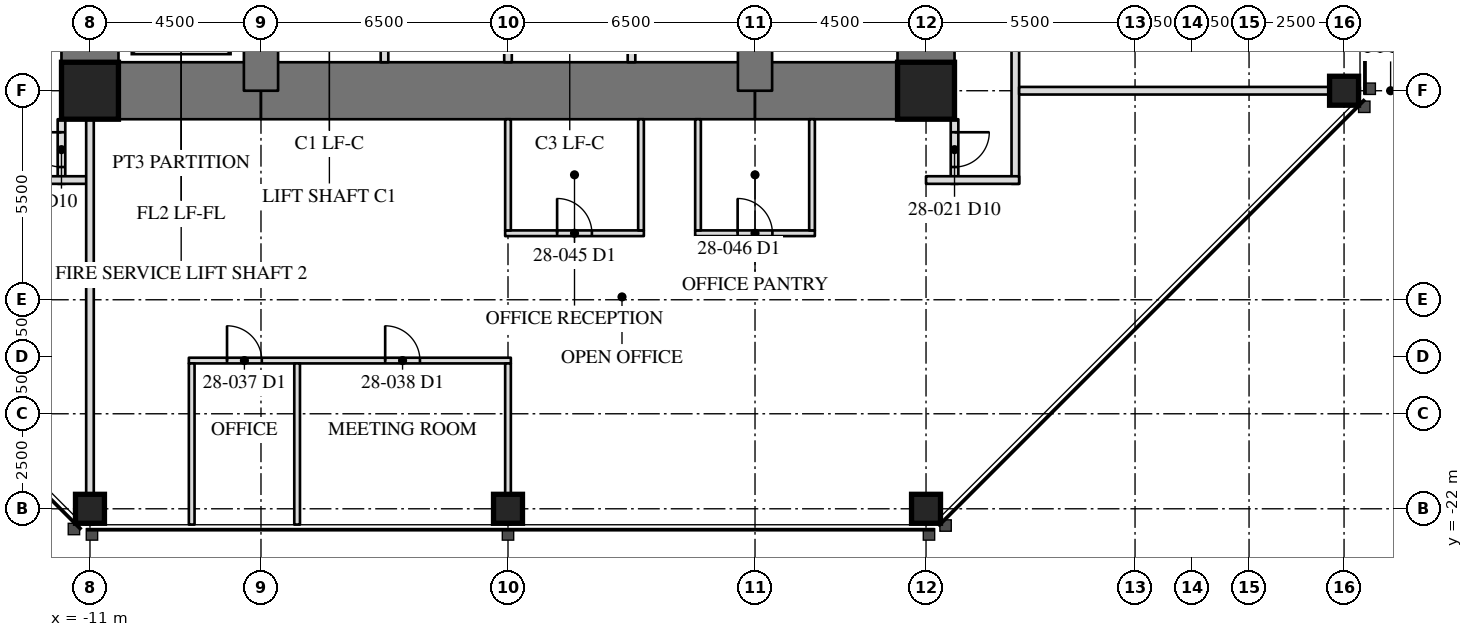
"""IFC4 building model, lengths in metres.
Left out: names, types, materials, properties, quantities, classifications, styles, units other than length and angle.
Written with IfcOpenShell. Run it as: python <this file> out.ifc"""

import sys

from ifc_helpers import new_model, si_unit, direction, frame, frame_2d, origin, origin_2d, place, context, subcontext, project, spatial, rectangle, hollow_rectangle, extrude, element, fill, save


model = new_model("IFC4")
c1 = context("Model", 3, precision=1e-05, world=origin(), true_north=direction((0.0, 1.0)))
c2 = subcontext(c1, "Body", "Model", "MODEL_VIEW")
j1 = project(units=[si_unit("LENGTHUNIT", "METRE"), si_unit("PLANEANGLEUNIT", "RADIAN")], contexts=[c1])
p1 = place(None, origin())
s1 = spatial("IfcSite", under=j1, at=p1, CompositionType="ELEMENT")
p2 = place(p1, origin())
s2 = spatial("IfcBuilding", under=s1, at=p2, CompositionType="ELEMENT")
p3 = place(p2, frame((0.0, 0.0, 121.3)))
s3 = spatial("IfcBuildingStorey", under=s2, at=p3, CompositionType="ELEMENT", Elevation=121.3)
for number, where, z_axis, x_axis in (
    (1, (-11.0, -22.0, 0.0), (0.0, 0.0, 1.0), (1.0, 0.0, 0.0)),
    (2, (0.0, -22.0, 0.0), (0.0, 0.0, 1.0), (1.0, 0.0, 0.0)),
    (3, (11.0, -22.0, 0.0), (0.0, 0.0, 1.0), (1.0, 0.0, 0.0)),
    (4, (22.0, -11.0, 0.0), (0.0, 0.0, 1.0), (0.0, 1.0, 0.0)),
):
    element("IfcColumn", number, at=place(p3, frame(where, z_axis=z_axis, x_axis=x_axis)), inside=s3, PredefinedType="COLUMN", context=c2, shape_type="SweptSolid", body=[
        extrude(hollow_rectangle(XDim=0.762, YDim=0.762, WallThickness=0.127, at=origin_2d()), origin(), (0.0, 0.0, 1.0), 4.1),
    ])
p4 = place(p3, frame((11.0, -11.0, 0.0), z_axis=(0.0, 0.0, 1.0), x_axis=(0.0, 1.0, 0.0)))
e5 = element("IfcWall", 5, at=p4, inside=s3, PredefinedType="SHEAR", context=c2, shape_type="SweptSolid", body=[
    extrude(rectangle(XDim=22.0, YDim=1.5, at=frame_2d((11.0, 0.0))), origin(), (0.0, 0.0, 1.0), 4.1),
])
p5 = place(p4, frame((15.393, 0.0, 0.0)))
e6 = element("IfcOpeningElement", 6, at=p5, cuts=e5, PredefinedType="OPENING", context=c2, shape_type="SweptSolid", body=[
    extrude(rectangle(XDim=0.915, YDim=2.134, at=frame_2d((0.458, 1.067))), frame((0.0, 0.76, 0.0), z_axis=(0.0, -1.0, 0.0), x_axis=(1.0, 0.0, 0.0)), (0.0, 0.0, 1.0), 1.52),
])
p6 = place(p3, frame((-11.0, 11.0, 0.0), z_axis=(0.0, 0.0, 1.0), x_axis=(0.0, -1.0, 0.0)))
e7 = element("IfcWall", 7, at=p6, inside=s3, PredefinedType="SHEAR", context=c2, shape_type="SweptSolid", body=[
    extrude(rectangle(XDim=22.0, YDim=1.5, at=frame_2d((11.0, 0.0))), origin(), (0.0, 0.0, 1.0), 4.1),
])
p7 = place(p6, frame((15.393, 0.0, 0.0)))
e8 = element("IfcOpeningElement", 8, at=p7, cuts=e7, PredefinedType="OPENING", context=c2, shape_type="SweptSolid", body=[
    extrude(rectangle(XDim=0.915, YDim=2.134, at=frame_2d((0.458, 1.067))), frame((0.0, 0.76, 0.0), z_axis=(0.0, -1.0, 0.0), x_axis=(1.0, 0.0, 0.0)), (0.0, 0.0, 1.0), 1.52),
])
p8 = place(p3, frame((-11.0, -11.0, 0.0), z_axis=(0.0, 0.0, 1.0), x_axis=(1.0, 0.0, 0.0)))
e9 = element("IfcWall", 9, at=p8, inside=s3, PredefinedType="SHEAR", context=c2, shape_type="SweptSolid", body=[
    extrude(rectangle(XDim=4.5, YDim=1.5, at=frame_2d((2.25, 0.0))), origin(), (0.0, 0.0, 1.0), 4.1),
])
p9 = place(p3, frame((-6.5, -11.0, 0.0), z_axis=(0.0, 0.0, 1.0), x_axis=(1.0, 0.0, 0.0)))
e10 = element("IfcWall", 10, at=p9, inside=s3, PredefinedType="SHEAR", context=c2, shape_type="SweptSolid", body=[
    extrude(rectangle(XDim=13.0, YDim=1.5, at=frame_2d((6.5, 0.0))), origin(), (0.0, 0.0, 1.0), 4.1),
])
p10 = place(p3, frame((6.5, -11.0, 0.0), z_axis=(0.0, 0.0, 1.0), x_axis=(1.0, 0.0, 0.0)))
e11 = element("IfcWall", 11, at=p10, inside=s3, PredefinedType="SHEAR", context=c2, shape_type="SweptSolid", body=[
    extrude(rectangle(XDim=4.5, YDim=1.5, at=frame_2d((2.25, 0.0))), origin(), (0.0, 0.0, 1.0), 4.1),
])
for number, where, z_axis, x_axis in (
    (12, (6.5, -11.0, 0.0), (0.0, 0.0, 1.0), (0.0, 1.0, 0.0)),
    (13, (-6.5, -6.5, 0.0), (0.0, 0.0, 1.0), (0.0, -1.0, 0.0)),
):
    element("IfcWall", number, at=place(p3, frame(where, z_axis=z_axis, x_axis=x_axis)), inside=s3, PredefinedType="SHEAR", context=c2, shape_type="SweptSolid", body=[
        extrude(rectangle(XDim=4.5, YDim=0.9, at=frame_2d((2.25, 0.0))), origin(), (0.0, 0.0, 1.0), 4.1),
    ])
for number, where, z_axis, x_axis in (
    (14, (-11.0, -11.0, 0.0), (0.0, 0.0, 1.0), (1.0, 0.0, 0.0)),
    (15, (11.0, -11.0, 0.0), (0.0, 0.0, 1.0), (1.0, 0.0, 0.0)),
):
    element("IfcColumn", number, at=place(p3, frame(where, z_axis=z_axis, x_axis=x_axis)), inside=s3, PredefinedType="COLUMN", context=c2, shape_type="SweptSolid", body=[
        extrude(hollow_rectangle(XDim=1.499, YDim=1.499, WallThickness=0.102, at=origin_2d()), origin(), (0.0, 0.0, 1.0), 4.1),
    ])
for number, where, z_axis, x_axis in (
    (16, (-3.25, -10.25, 0.0), (0.0, 0.0, 1.0), (0.0, 1.0, 0.0)),
    (17, (0.0, -10.25, 0.0), (0.0, 0.0, 1.0), (0.0, 1.0, 0.0)),
    (18, (3.25, -10.25, 0.0), (0.0, 0.0, 1.0), (0.0, 1.0, 0.0)),
):
    element("IfcWall", number, at=place(p3, frame(where, z_axis=z_axis, x_axis=x_axis)), inside=s3, PredefinedType="PARTITIONING", context=c2, shape_type="SweptSolid", body=[
        extrude(rectangle(XDim=3.3, YDim=0.2, at=frame_2d((1.65, 0.0))), origin(), (0.0, 0.0, 1.0), 3.91),
    ])
p11 = place(p3, frame((13.35, -13.45, 0.0), z_axis=(0.0, 0.0, 1.0), x_axis=(0.0, 1.0, 0.0)))
e19 = element("IfcWall", 19, at=p11, inside=s3, PredefinedType="PARTITIONING", context=c2, shape_type="SweptSolid", body=[
    extrude(rectangle(XDim=26.7, YDim=0.2, at=frame_2d((13.35, 0.0))), origin(), (0.0, 0.0, 1.0), 3.91),
])
p12 = place(p11, frame((6.742, 0.0, 0.0)))
e20 = element("IfcOpeningElement", 20, at=p12, cuts=e19, PredefinedType="OPENING", context=c2, shape_type="SweptSolid", body=[
    extrude(rectangle(XDim=0.915, YDim=2.134, at=frame_2d((0.458, 1.067))), frame((0.0, 0.11, 0.0), z_axis=(0.0, -1.0, 0.0), x_axis=(1.0, 0.0, 0.0)), (0.0, 0.0, 1.0), 0.22),
])
p13 = place(p3, frame((11.75, -11.75, 0.0), z_axis=(0.0, 0.0, 1.0), x_axis=(0.0, -1.0, 0.0)))
e21 = element("IfcWall", 21, at=p13, inside=s3, PredefinedType="PARTITIONING", context=c2, shape_type="SweptSolid", body=[
    extrude(rectangle(XDim=1.7, YDim=0.2, at=frame_2d((0.85, 0.0))), origin(), (0.0, 0.0, 1.0), 3.91),
])
p14 = place(p13, frame((0.343, 0.0, 0.0)))
e22 = element("IfcOpeningElement", 22, at=p14, cuts=e21, PredefinedType="OPENING", context=c2, shape_type="SweptSolid", body=[
    extrude(rectangle(XDim=0.915, YDim=2.134, at=frame_2d((0.458, 1.067))), frame((0.0, 0.11, 0.0), z_axis=(0.0, -1.0, 0.0), x_axis=(1.0, 0.0, 0.0)), (0.0, 0.0, 1.0), 0.22),
])
p15 = place(p3, frame((11.0, -13.35, 0.0), z_axis=(0.0, 0.0, 1.0), x_axis=(1.0, 0.0, 0.0)))
e23 = element("IfcWall", 23, at=p15, inside=s3, PredefinedType="PARTITIONING", context=c2, shape_type="SweptSolid", body=[
    extrude(rectangle(XDim=2.45, YDim=0.2, at=frame_2d((1.225, 0.0))), origin(), (0.0, 0.0, 1.0), 3.91),
])
p16 = place(p3, frame((-11.75, -11.75, 0.0), z_axis=(0.0, 0.0, 1.0), x_axis=(0.0, -1.0, 0.0)))
e24 = element("IfcWall", 24, at=p16, inside=s3, PredefinedType="PARTITIONING", context=c2, shape_type="SweptSolid", body=[
    extrude(rectangle(XDim=1.7, YDim=0.2, at=frame_2d((0.85, 0.0))), origin(), (0.0, 0.0, 1.0), 3.91),
])
p17 = place(p16, frame((0.343, 0.0, 0.0)))
e25 = element("IfcOpeningElement", 25, at=p17, cuts=e24, PredefinedType="OPENING", context=c2, shape_type="SweptSolid", body=[
    extrude(rectangle(XDim=0.915, YDim=2.134, at=frame_2d((0.458, 1.067))), frame((0.0, 0.11, 0.0), z_axis=(0.0, -1.0, 0.0), x_axis=(1.0, 0.0, 0.0)), (0.0, 0.0, 1.0), 0.22),
])
p18 = place(p3, frame((-11.0, -13.35, 0.0), z_axis=(0.0, 0.0, 1.0), x_axis=(-1.0, 0.0, 0.0)))
e26 = element("IfcWall", 26, at=p18, inside=s3, PredefinedType="PARTITIONING", context=c2, shape_type="SweptSolid", body=[
    extrude(rectangle(XDim=2.45, YDim=0.2, at=frame_2d((1.225, 0.0))), origin(), (0.0, 0.0, 1.0), 3.91),
])
p19 = place(p3, frame((-11.0, -11.75, 0.0), z_axis=(0.0, 0.0, 1.0), x_axis=(0.0, -1.0, 0.0)))
e27 = element("IfcWall", 27, at=p19, inside=s3, PredefinedType="PARTITIONING", context=c2, shape_type="SweptSolid", body=[
    extrude(rectangle(XDim=10.665, YDim=0.2, at=frame_2d((5.333, 0.0))), origin(), (0.0, 0.0, 1.0), 3.326),
])
p20 = place(p3, frame((13.45, -11.0, 0.0), z_axis=(0.0, 0.0, 1.0), x_axis=(1.0, 0.0, 0.0)))
e28 = element("IfcWall", 28, at=p20, inside=s3, PredefinedType="PARTITIONING", context=c2, shape_type="SweptSolid", body=[
    extrude(rectangle(XDim=8.965, YDim=0.2, at=frame_2d((4.482, 0.0))), origin(), (0.0, 0.0, 1.0), 3.326),
])
p21 = place(p3, frame((-8.398, -18.1, 0.0), z_axis=(0.0, 0.0, 1.0), x_axis=(1.0, 0.0, 0.0)))
e29 = element("IfcWall", 29, at=p21, inside=s3, PredefinedType="PARTITIONING", context=c2, shape_type="SweptSolid", body=[
    extrude(rectangle(XDim=8.473, YDim=0.15, at=frame_2d((4.236, 0.0))), origin(), (0.0, 0.0, 1.0), 3.91),
])
p22 = place(p21, frame((1.004, 0.0, 0.0)))
e30 = element("IfcOpeningElement", 30, at=p22, cuts=e29, PredefinedType="OPENING", context=c2, shape_type="SweptSolid", body=[
    extrude(rectangle(XDim=0.915, YDim=2.134, at=frame_2d((0.458, 1.067))), frame((0.0, 0.085, 0.0), z_axis=(0.0, -1.0, 0.0), x_axis=(1.0, 0.0, 0.0)), (0.0, 0.0, 1.0), 0.17),
])
p23 = place(p21, frame((5.166, 0.0, 0.0)))
e31 = element("IfcOpeningElement", 31, at=p23, cuts=e29, PredefinedType="OPENING", context=c2, shape_type="SweptSolid", body=[
    extrude(rectangle(XDim=0.915, YDim=2.134, at=frame_2d((0.458, 1.067))), frame((0.0, 0.085, 0.0), z_axis=(0.0, -1.0, 0.0), x_axis=(1.0, 0.0, 0.0)), (0.0, 0.0, 1.0), 0.17),
])
for number, where, z_axis, x_axis in (
    (32, (-8.323, -18.175, 0.0), (0.0, 0.0, 1.0), (0.0, -1.0, 0.0)),
    (33, (-5.549, -18.175, 0.0), (0.0, 0.0, 1.0), (0.0, -1.0, 0.0)),
):
    element("IfcWall", number, at=place(p3, frame(where, z_axis=z_axis, x_axis=x_axis)), inside=s3, PredefinedType="PARTITIONING", context=c2, shape_type="SweptSolid", body=[
        extrude(rectangle(XDim=4.24, YDim=0.15, at=frame_2d((2.12, 0.0))), origin(), (0.0, 0.0, 1.0), 3.91),
    ])
p24 = place(p3, frame((0.0, -18.175, 0.0), z_axis=(0.0, 0.0, 1.0), x_axis=(0.0, -1.0, 0.0)))
e34 = element("IfcWall", 34, at=p24, inside=s3, PredefinedType="PARTITIONING", context=c2, shape_type="SweptSolid", body=[
    extrude(rectangle(XDim=4.24, YDim=0.15, at=frame_2d((2.12, 0.0))), origin(), (0.0, 0.0, 1.0), 3.326),
])
p25 = place(p3, frame((-0.075, -14.75, 0.0), z_axis=(0.0, 0.0, 1.0), x_axis=(1.0, 0.0, 0.0)))
e35 = element("IfcWall", 35, at=p25, inside=s3, PredefinedType="PARTITIONING", context=c2, shape_type="SweptSolid", body=[
    extrude(rectangle(XDim=3.65, YDim=0.15, at=frame_2d((1.825, 0.0))), origin(), (0.0, 0.0, 1.0), 3.91),
])
p26 = place(p25, frame((1.367, 0.0, 0.0)))
e36 = element("IfcOpeningElement", 36, at=p26, cuts=e35, PredefinedType="OPENING", context=c2, shape_type="SweptSolid", body=[
    extrude(rectangle(XDim=0.915, YDim=2.134, at=frame_2d((0.458, 1.067))), frame((0.0, 0.085, 0.0), z_axis=(0.0, -1.0, 0.0), x_axis=(1.0, 0.0, 0.0)), (0.0, 0.0, 1.0), 0.17),
])
p27 = place(p3, frame((0.0, -14.675, 0.0), z_axis=(0.0, 0.0, 1.0), x_axis=(0.0, 1.0, 0.0)))
e37 = element("IfcWall", 37, at=p27, inside=s3, PredefinedType="PARTITIONING", context=c2, shape_type="SweptSolid", body=[
    extrude(rectangle(XDim=2.925, YDim=0.15, at=frame_2d((1.462, 0.0))), origin(), (0.0, 0.0, 1.0), 3.326),
])
p28 = place(p3, frame((3.5, -14.675, 0.0), z_axis=(0.0, 0.0, 1.0), x_axis=(0.0, 1.0, 0.0)))
e38 = element("IfcWall", 38, at=p28, inside=s3, PredefinedType="PARTITIONING", context=c2, shape_type="SweptSolid", body=[
    extrude(rectangle(XDim=2.925, YDim=0.15, at=frame_2d((1.462, 0.0))), origin(), (0.0, 0.0, 1.0), 3.91),
])
p29 = place(p3, frame((4.925, -14.75, 0.0), z_axis=(0.0, 0.0, 1.0), x_axis=(1.0, 0.0, 0.0)))
e39 = element("IfcWall", 39, at=p29, inside=s3, PredefinedType="PARTITIONING", context=c2, shape_type="SweptSolid", body=[
    extrude(rectangle(XDim=3.15, YDim=0.15, at=frame_2d((1.575, 0.0))), origin(), (0.0, 0.0, 1.0), 3.91),
])
p30 = place(p29, frame((1.117, 0.0, 0.0)))
e40 = element("IfcOpeningElement", 40, at=p30, cuts=e39, PredefinedType="OPENING", context=c2, shape_type="SweptSolid", body=[
    extrude(rectangle(XDim=0.915, YDim=2.134, at=frame_2d((0.458, 1.067))), frame((0.0, 0.085, 0.0), z_axis=(0.0, -1.0, 0.0), x_axis=(1.0, 0.0, 0.0)), (0.0, 0.0, 1.0), 0.17),
])
for number, where, z_axis, x_axis in (
    (41, (5.0, -14.675, 0.0), (0.0, 0.0, 1.0), (0.0, 1.0, 0.0)),
    (42, (8.0, -14.675, 0.0), (0.0, 0.0, 1.0), (0.0, 1.0, 0.0)),
):
    element("IfcWall", number, at=place(p3, frame(where, z_axis=z_axis, x_axis=x_axis)), inside=s3, PredefinedType="PARTITIONING", context=c2, shape_type="SweptSolid", body=[
        extrude(rectangle(XDim=2.925, YDim=0.15, at=frame_2d((1.462, 0.0))), origin(), (0.0, 0.0, 1.0), 3.91),
    ])
p31 = place(p14, origin())
e43 = element("IfcDoor", 43, at=p31, inside=s3, OperationType="SINGLE_SWING_LEFT", PredefinedType="DOOR", context=c2, shape_type="SweptSolid", body=[
    extrude(rectangle(XDim=0.915, YDim=2.134, at=frame_2d((0.458, 1.067))), frame((0.0, 0.025, 0.0), z_axis=(0.0, -1.0, 0.0), x_axis=(1.0, 0.0, 0.0)), (0.0, 0.0, 1.0), 0.05),
])
fill(e22, e43)
p32 = place(p17, frame((0.915, 0.0, 0.0), z_axis=(0.0, 0.0, 1.0), x_axis=(-1.0, 0.0, 0.0)))
e44 = element("IfcDoor", 44, at=p32, inside=s3, OperationType="SINGLE_SWING_LEFT", PredefinedType="DOOR", context=c2, shape_type="SweptSolid", body=[
    extrude(rectangle(XDim=0.915, YDim=2.134, at=frame_2d((0.458, 1.067))), frame((0.0, 0.025, 0.0), z_axis=(0.0, -1.0, 0.0), x_axis=(1.0, 0.0, 0.0)), (0.0, 0.0, 1.0), 0.05),
])
fill(e25, e44)
p33 = place(p22, origin())
e45 = element("IfcDoor", 45, at=p33, inside=s3, OperationType="SINGLE_SWING_LEFT", PredefinedType="DOOR", context=c2, shape_type="SweptSolid", body=[
    extrude(rectangle(XDim=0.915, YDim=2.134, at=frame_2d((0.458, 1.067))), frame((0.0, 0.025, 0.0), z_axis=(0.0, -1.0, 0.0), x_axis=(1.0, 0.0, 0.0)), (0.0, 0.0, 1.0), 0.05),
])
fill(e30, e45)
p34 = place(p23, origin())
e46 = element("IfcDoor", 46, at=p34, inside=s3, OperationType="SINGLE_SWING_LEFT", PredefinedType="DOOR", context=c2, shape_type="SweptSolid", body=[
    extrude(rectangle(XDim=0.915, YDim=2.134, at=frame_2d((0.458, 1.067))), frame((0.0, 0.025, 0.0), z_axis=(0.0, -1.0, 0.0), x_axis=(1.0, 0.0, 0.0)), (0.0, 0.0, 1.0), 0.05),
])
fill(e31, e46)
p35 = place(p26, origin())
e47 = element("IfcDoor", 47, at=p35, inside=s3, OperationType="SINGLE_SWING_LEFT", PredefinedType="DOOR", context=c2, shape_type="SweptSolid", body=[
    extrude(rectangle(XDim=0.915, YDim=2.134, at=frame_2d((0.458, 1.067))), frame((0.0, 0.025, 0.0), z_axis=(0.0, -1.0, 0.0), x_axis=(1.0, 0.0, 0.0)), (0.0, 0.0, 1.0), 0.05),
])
fill(e36, e47)
p36 = place(p30, origin())
e48 = element("IfcDoor", 48, at=p36, inside=s3, OperationType="SINGLE_SWING_LEFT", PredefinedType="DOOR", context=c2, shape_type="SweptSolid", body=[
    extrude(rectangle(XDim=0.915, YDim=2.134, at=frame_2d((0.458, 1.067))), frame((0.0, 0.025, 0.0), z_axis=(0.0, -1.0, 0.0), x_axis=(1.0, 0.0, 0.0)), (0.0, 0.0, 1.0), 0.05),
])
fill(e40, e48)
save(model, sys.argv[1])
